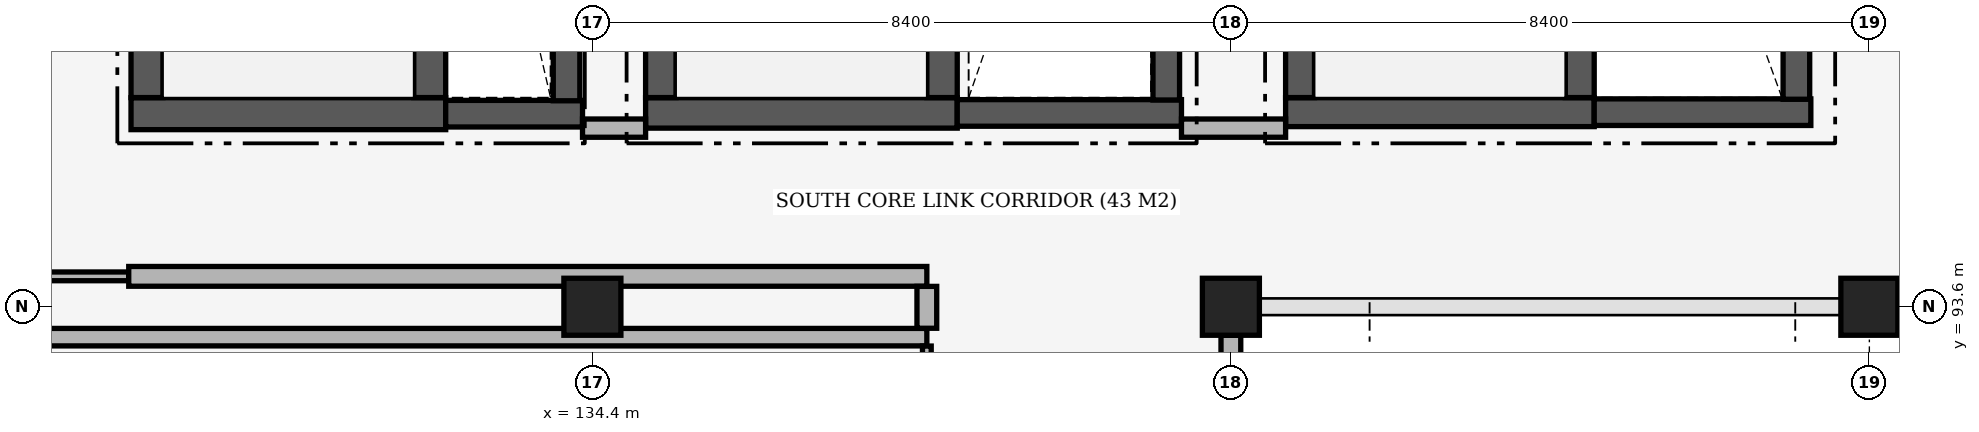
"""IFC4 building model, lengths in metres.
Left out: names, types, materials, properties, quantities, classifications, styles, units other than length and angle.
Written with IfcOpenShell. Run it as: python <this file> out.ifc"""

import sys

from ifc_helpers import new_model, si_unit, direction, frame, frame_2d, origin, origin_2d, place, context, subcontext, project, spatial, rectangle, extrude, element, save


model = new_model("IFC4")
c1 = context("Model", 3, precision=1e-05, world=origin(), true_north=direction((0.0, 1.0)))
c2 = subcontext(c1, "Body", "Model", "MODEL_VIEW")
j1 = project(units=[si_unit("LENGTHUNIT", "METRE"), si_unit("PLANEANGLEUNIT", "RADIAN")], contexts=[c1])
p1 = place(None, origin())
s1 = spatial("IfcSite", under=j1, at=p1, CompositionType="ELEMENT")
p2 = place(p1, origin())
s2 = spatial("IfcBuilding", under=s1, at=p2, CompositionType="ELEMENT")
p3 = place(p2, frame((0.0, 0.0, 20.4)))
s3 = spatial("IfcBuildingStorey", under=s2, at=p3, CompositionType="ELEMENT", Elevation=20.4)
for number, where, z_axis, x_axis in (
    (1, (134.4, 93.6, 0.0), (0.0, 0.0, 1.0), (1.0, 0.0, 0.0)),
    (2, (142.8, 93.6, 0.0), (0.0, 0.0, 1.0), (1.0, 0.0, 0.0)),
    (3, (151.2, 93.6, 0.0), (0.0, 0.0, 1.0), (1.0, 0.0, 0.0)),
):
    element("IfcColumn", number, at=place(p3, frame(where, z_axis=z_axis, x_axis=x_axis)), inside=s3, PredefinedType="COLUMN", context=c2, shape_type="SweptSolid", body=[
        extrude(rectangle(XDim=0.75, YDim=0.75, at=origin_2d()), origin(), (0.0, 0.0, 1.0), 4.8),
    ])
p4 = place(p3, frame((156.225, 93.6, 0.0), z_axis=(0.0, 0.0, 1.0), x_axis=(-1.0, 0.0, 0.0)))
e4 = element("IfcWall", 4, at=p4, inside=s3, PredefinedType="SOLIDWALL", context=c2, shape_type="SweptSolid", body=[
    extrude(rectangle(XDim=4.65, YDim=0.26, at=frame_2d((2.325, 0.0))), origin(), (0.0, 0.0, 1.0), 3.95),
])
p5 = place(p4, frame((2.75, 0.0, 1.05)))
e5 = element("IfcOpeningElement", 5, at=p5, cuts=e4, PredefinedType="OPENING", context=c2, shape_type="SweptSolid", body=[
    extrude(rectangle(XDim=1.05, YDim=1.8, at=frame_2d((0.525, 0.9))), frame((0.0, 0.145, 0.0), z_axis=(0.0, -1.0, 0.0), x_axis=(1.0, 0.0, 0.0)), (0.0, 0.0, 1.0), 0.29),
])
p6 = place(p3, frame((142.8, 93.225, 0.0), z_axis=(0.0, 0.0, 1.0), x_axis=(0.0, -1.0, 0.0)))
e6 = element("IfcWall", 6, at=p6, inside=s3, PredefinedType="SOLIDWALL", context=c2, shape_type="SweptSolid", body=[
    extrude(rectangle(XDim=7.65, YDim=0.26, at=frame_2d((3.825, 0.0))), origin(), (0.0, 0.0, 1.0), 3.85),
])
p7 = place(p6, frame((1.85, 0.0, 1.05)))
e7 = element("IfcOpeningElement", 7, at=p7, cuts=e6, PredefinedType="OPENING", context=c2, shape_type="SweptSolid", body=[
    extrude(rectangle(XDim=1.05, YDim=1.8, at=frame_2d((0.525, 0.9))), frame((0.0, 0.145, 0.0), z_axis=(0.0, -1.0, 0.0), x_axis=(1.0, 0.0, 0.0)), (0.0, 0.0, 1.0), 0.29),
])
p8 = place(p6, frame((4.75, 0.0, 1.05)))
e8 = element("IfcOpeningElement", 8, at=p8, cuts=e6, PredefinedType="OPENING", context=c2, shape_type="SweptSolid", body=[
    extrude(rectangle(XDim=1.05, YDim=1.8, at=frame_2d((0.525, 0.9))), frame((0.0, 0.145, 0.0), z_axis=(0.0, -1.0, 0.0), x_axis=(1.0, 0.0, 0.0)), (0.0, 0.0, 1.0), 0.29),
])
p9 = place(p3, frame((128.33, 96.14, 0.0), z_axis=(0.0, 0.0, 1.0), x_axis=(1.0, 0.0, 0.0)))
e9 = element("IfcWall", 9, at=p9, inside=s3, PredefinedType="SHEAR", context=c2, shape_type="SweptSolid", body=[
    extrude(rectangle(XDim=4.14, YDim=0.42, at=frame_2d((2.07, 0.0))), origin(), (0.0, 0.0, 1.0), 4.55),
])
for number, where, z_axis, x_axis in (
    (10, (128.54, 96.352, 0.0), (0.0, 0.0, 1.0), (0.0, 1.0, 0.0)),
    (11, (132.26, 96.352, 0.0), (0.0, 0.0, 1.0), (0.0, 1.0, 0.0)),
):
    element("IfcWall", number, at=place(p3, frame(where, z_axis=z_axis, x_axis=x_axis)), inside=s3, PredefinedType="SHEAR", context=c2, shape_type="SweptSolid", body=[
        extrude(rectangle(XDim=6.896, YDim=0.42, at=frame_2d((3.448, 0.0))), origin(), (0.0, 0.0, 1.0), 4.55),
    ])
p10 = place(p3, frame((132.47, 96.14, 0.0), z_axis=(0.0, 0.0, 1.0), x_axis=(1.0, 0.0, 0.0)))
e12 = element("IfcWall", 12, at=p10, inside=s3, PredefinedType="SHEAR", context=c2, shape_type="SweptSolid", body=[
    extrude(rectangle(XDim=1.8, YDim=0.35, at=frame_2d((0.9, 0.0))), origin(), (0.0, 0.0, 1.0), 4.55),
])
p11 = place(p3, frame((134.06, 96.31, 0.0), z_axis=(0.0, 0.0, 1.0), x_axis=(0.0, 1.0, 0.0)))
e13 = element("IfcWall", 13, at=p11, inside=s3, PredefinedType="SHEAR", context=c2, shape_type="SweptSolid", body=[
    extrude(rectangle(XDim=7.197, YDim=0.35, at=frame_2d((3.599, 0.0))), origin(), (0.0, 0.0, 1.0), 4.55),
])
p12 = place(p3, frame((135.1, 96.15, 0.0), z_axis=(0.0, 0.0, 1.0), x_axis=(1.0, 0.0, 0.0)))
e14 = element("IfcWall", 14, at=p12, inside=s3, PredefinedType="SHEAR", context=c2, shape_type="SweptSolid", body=[
    extrude(rectangle(XDim=4.1, YDim=0.4, at=frame_2d((2.05, 0.0))), origin(), (0.0, 0.0, 1.0), 4.55),
])
for number, where, z_axis, x_axis in (
    (15, (135.3, 96.352, 0.0), (0.0, 0.0, 1.0), (0.0, 1.0, 0.0)),
    (16, (139.0, 96.352, 0.0), (0.0, 0.0, 1.0), (0.0, 1.0, 0.0)),
):
    element("IfcWall", number, at=place(p3, frame(where, z_axis=z_axis, x_axis=x_axis)), inside=s3, PredefinedType="SHEAR", context=c2, shape_type="SweptSolid", body=[
        extrude(rectangle(XDim=6.896, YDim=0.4, at=frame_2d((3.448, 0.0))), origin(), (0.0, 0.0, 1.0), 4.55),
    ])
p13 = place(p3, frame((139.2, 96.15, 0.0), z_axis=(0.0, 0.0, 1.0), x_axis=(1.0, 0.0, 0.0)))
e17 = element("IfcWall", 17, at=p13, inside=s3, PredefinedType="SHEAR", context=c2, shape_type="SweptSolid", body=[
    extrude(rectangle(XDim=2.95, YDim=0.35, at=frame_2d((1.475, 0.0))), origin(), (0.0, 0.0, 1.0), 4.55),
])
p14 = place(p3, frame((141.95, 96.32, 0.0), z_axis=(0.0, 0.0, 1.0), x_axis=(0.0, 1.0, 0.0)))
e18 = element("IfcWall", 18, at=p14, inside=s3, PredefinedType="SHEAR", context=c2, shape_type="SweptSolid", body=[
    extrude(rectangle(XDim=7.187, YDim=0.35, at=frame_2d((3.594, 0.0))), origin(), (0.0, 0.0, 1.0), 4.55),
])
p15 = place(p3, frame((143.52, 96.16, 0.0), z_axis=(0.0, 0.0, 1.0), x_axis=(1.0, 0.0, 0.0)))
e19 = element("IfcWall", 19, at=p15, inside=s3, PredefinedType="SHEAR", context=c2, shape_type="SweptSolid", body=[
    extrude(rectangle(XDim=4.06, YDim=0.38, at=frame_2d((2.03, 0.0))), origin(), (0.0, 0.0, 1.0), 4.55),
])
for number, where, z_axis, x_axis in (
    (20, (143.71, 96.352, 0.0), (0.0, 0.0, 1.0), (0.0, 1.0, 0.0)),
    (21, (147.39, 96.352, 0.0), (0.0, 0.0, 1.0), (0.0, 1.0, 0.0)),
):
    element("IfcWall", number, at=place(p3, frame(where, z_axis=z_axis, x_axis=x_axis)), inside=s3, PredefinedType="SHEAR", context=c2, shape_type="SweptSolid", body=[
        extrude(rectangle(XDim=6.896, YDim=0.38, at=frame_2d((3.448, 0.0))), origin(), (0.0, 0.0, 1.0), 4.55),
    ])
p16 = place(p3, frame((147.58, 96.16, 0.0), z_axis=(0.0, 0.0, 1.0), x_axis=(1.0, 0.0, 0.0)))
e22 = element("IfcWall", 22, at=p16, inside=s3, PredefinedType="SHEAR", context=c2, shape_type="SweptSolid", body=[
    extrude(rectangle(XDim=2.85, YDim=0.35, at=frame_2d((1.425, 0.0))), origin(), (0.0, 0.0, 1.0), 4.55),
])
p17 = place(p3, frame((150.24, 96.33, 0.0), z_axis=(0.0, 0.0, 1.0), x_axis=(0.0, 1.0, 0.0)))
e23 = element("IfcWall", 23, at=p17, inside=s3, PredefinedType="SHEAR", context=c2, shape_type="SweptSolid", body=[
    extrude(rectangle(XDim=7.177, YDim=0.35, at=frame_2d((3.588, 0.0))), origin(), (0.0, 0.0, 1.0), 4.55),
])
p18 = place(p3, frame((126.105, 93.2, 0.0), z_axis=(0.0, 0.0, 1.0), x_axis=(1.0, 0.0, 0.0)))
e24 = element("IfcWall", 24, at=p18, inside=s3, PredefinedType="SOLIDWALL", context=c2, shape_type="SweptSolid", body=[
    extrude(rectangle(XDim=12.695, YDim=0.23, at=frame_2d((6.348, 0.0))), origin(), (0.0, 0.0, 1.0), 3.85),
])
p19 = place(p3, frame((126.132, 94.0, 0.0), z_axis=(0.0, 0.0, 1.0), x_axis=(1.0, 0.0, 0.0)))
e25 = element("IfcWall", 25, at=p19, inside=s3, PredefinedType="PARTITIONING", context=c2, shape_type="SweptSolid", body=[
    extrude(rectangle(XDim=2.168, YDim=0.115, at=frame_2d((1.084, 0.0))), origin(), (0.0, 0.0, 1.0), 4.0),
])
p20 = place(p3, frame((128.3, 94.0, 0.0), z_axis=(0.0, 0.0, 1.0), x_axis=(1.0, 0.0, 0.0)))
e26 = element("IfcWall", 26, at=p20, inside=s3, PredefinedType="PARTITIONING", context=c2, shape_type="SweptSolid", body=[
    extrude(rectangle(XDim=10.5, YDim=0.26, at=frame_2d((5.25, 0.0))), origin(), (0.0, 0.0, 1.0), 4.0),
])
p21 = place(p3, frame((134.27, 95.95, 0.0), z_axis=(0.0, 0.0, 1.0), x_axis=(1.0, 0.0, 0.0)))
e27 = element("IfcWall", 27, at=p21, inside=s3, PredefinedType="PARTITIONING", context=c2, shape_type="SweptSolid", body=[
    extrude(rectangle(XDim=0.83, YDim=0.24, at=frame_2d((0.415, 0.0))), origin(), (0.0, 0.0, 1.0), 4.0),
])
p22 = place(p3, frame((142.15, 95.95, 0.0), z_axis=(0.0, 0.0, 1.0), x_axis=(1.0, 0.0, 0.0)))
e28 = element("IfcWall", 28, at=p22, inside=s3, PredefinedType="PARTITIONING", context=c2, shape_type="SweptSolid", body=[
    extrude(rectangle(XDim=1.37, YDim=0.24, at=frame_2d((0.685, 0.0))), origin(), (0.0, 0.0, 1.0), 4.0),
])
p23 = place(p3, frame((138.8, 79.932, 0.0), z_axis=(0.0, 0.0, 1.0), x_axis=(0.0, 1.0, 0.0)))
e29 = element("IfcWall", 29, at=p23, inside=s3, PredefinedType="PARTITIONING", context=c2, shape_type="SweptSolid", body=[
    extrude(rectangle(XDim=13.151, YDim=0.115, at=frame_2d((6.576, 0.0))), origin(), (0.0, 0.0, 1.0), 3.85),
])
p24 = place(p23, frame((6.025, 0.0, 0.0)))
e30 = element("IfcOpeningElement", 30, at=p24, cuts=e29, PredefinedType="OPENING", context=c2, shape_type="SweptSolid", body=[
    extrude(rectangle(XDim=1.1, YDim=2.1, at=frame_2d((0.55, 1.05))), frame((0.0, 0.072, 0.0), z_axis=(0.0, -1.0, 0.0), x_axis=(1.0, 0.0, 0.0)), (0.0, 0.0, 1.0), 0.145),
])
p25 = place(p3, frame((138.8, 93.317, 0.0), z_axis=(0.0, 0.0, 1.0), x_axis=(0.0, 1.0, 0.0)))
e31 = element("IfcWall", 31, at=p25, inside=s3, PredefinedType="PARTITIONING", context=c2, shape_type="SweptSolid", body=[
    extrude(rectangle(XDim=0.551, YDim=0.26, at=frame_2d((0.275, 0.0))), origin(), (0.0, 0.0, 1.0), 3.85),
])
save(model, sys.argv[1])
